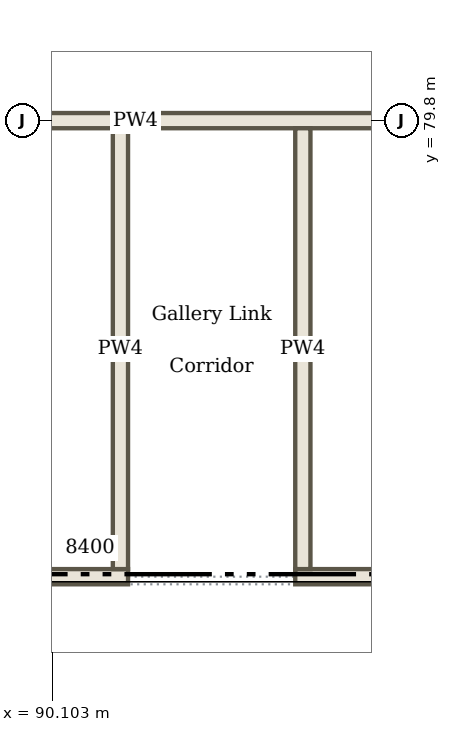
"""IFC4 building model, lengths in metres.
Left out: names, types, materials, properties, quantities, classifications, styles, units other than length and angle.
Written with IfcOpenShell. Run it as: python <this file> out.ifc"""

import sys

from ifc_helpers import new_model, si_unit, direction, frame, frame_2d, origin, place, context, subcontext, project, spatial, rectangle, extrude, element, save


model = new_model("IFC4")
c1 = context("Model", 3, precision=1e-05, world=origin(), true_north=direction((0.0, 1.0)))
c2 = subcontext(c1, "Body", "Model", "MODEL_VIEW")
j1 = project(units=[si_unit("LENGTHUNIT", "METRE"), si_unit("PLANEANGLEUNIT", "RADIAN")], contexts=[c1])
p1 = place(None, origin())
s1 = spatial("IfcSite", under=j1, at=p1, CompositionType="ELEMENT")
p2 = place(p1, origin())
s2 = spatial("IfcBuilding", under=s1, at=p2, CompositionType="ELEMENT")
p3 = place(p2, frame((0.0, 0.0, 4.5)))
s3 = spatial("IfcBuildingStorey", under=s2, at=p3, CompositionType="ELEMENT", Elevation=4.5)
p4 = place(p3, frame((74.9, 73.8, 0.0), z_axis=(0.0, 0.0, 1.0), x_axis=(1.0, 0.0, 0.0)))
e1 = element("IfcWall", 1, at=p4, inside=s3, PredefinedType="PARTITIONING", context=c2, shape_type="SweptSolid", body=[
    extrude(rectangle(XDim=16.2, YDim=0.2, at=frame_2d((8.1, 0.0))), origin(), (0.0, 0.0, 1.0), 4.2),
])
p5 = place(p3, frame((93.3, 73.8, 0.0), z_axis=(0.0, 0.0, 1.0), x_axis=(1.0, 0.0, 0.0)))
e2 = element("IfcWall", 2, at=p5, inside=s3, PredefinedType="PARTITIONING", context=c2, shape_type="SweptSolid", body=[
    extrude(rectangle(XDim=16.0, YDim=0.2, at=frame_2d((8.0, 0.0))), origin(), (0.0, 0.0, 1.0), 4.2),
])
p6 = place(p3, frame((86.6, 79.8, 0.0), z_axis=(0.0, 0.0, 1.0), x_axis=(1.0, 0.0, 0.0)))
e3 = element("IfcWall", 3, at=p6, inside=s3, PredefinedType="PARTITIONING", context=c2, shape_type="SweptSolid", body=[
    extrude(rectangle(XDim=8.0, YDim=0.2, at=frame_2d((4.0, 0.0))), origin(), (0.0, 0.0, 1.0), 3.781),
])
p7 = place(p6, frame((0.2, 0.0, 0.0)))
e4 = element("IfcOpeningElement", 4, at=p7, cuts=e3, PredefinedType="OPENING", context=c2, shape_type="SweptSolid", body=[
    extrude(rectangle(XDim=1.0, YDim=2.1, at=frame_2d((0.5, 1.05))), frame((0.0, 0.11, 0.0), z_axis=(0.0, -1.0, 0.0), x_axis=(1.0, 0.0, 0.0)), (0.0, 0.0, 1.0), 0.22),
])
for number, where, z_axis, x_axis in (
    (5, (91.0, 73.9, 0.0), (0.0, 0.0, 1.0), (0.0, 1.0, 0.0)),
    (6, (93.4, 73.9, 0.0), (0.0, 0.0, 1.0), (0.0, 1.0, 0.0)),
):
    element("IfcWall", number, at=place(p3, frame(where, z_axis=z_axis, x_axis=x_axis)), inside=s3, PredefinedType="PARTITIONING", context=c2, shape_type="SweptSolid", body=[
        extrude(rectangle(XDim=5.8, YDim=0.2, at=frame_2d((2.9, 0.0))), origin(), (0.0, 0.0, 1.0), 3.781),
    ])
save(model, sys.argv[1])
